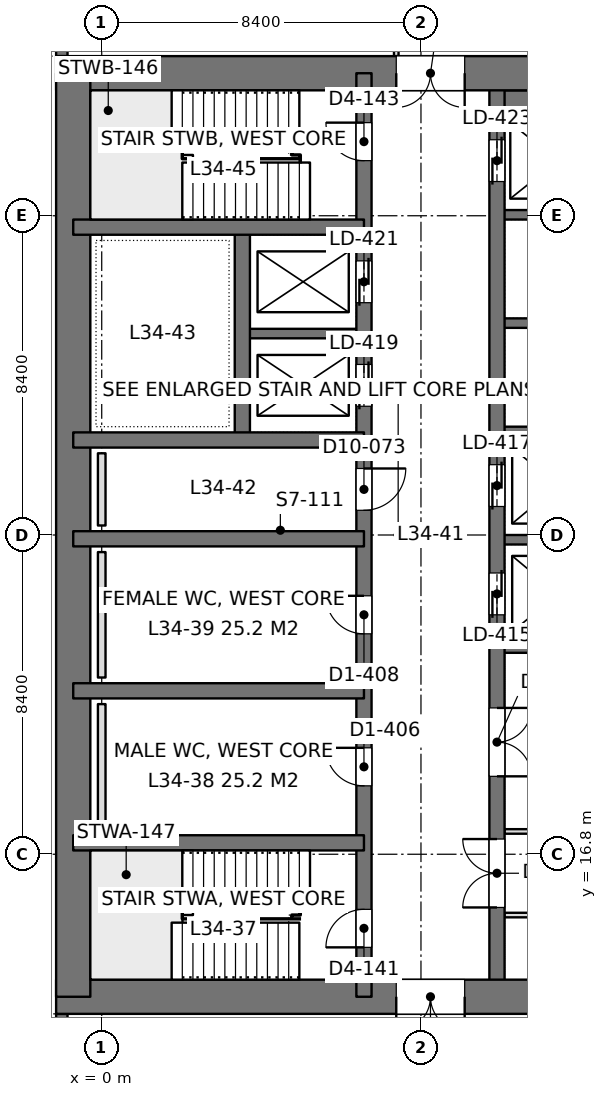
"""IFC4 building model, lengths in metres.
Left out: names, types, materials, properties, quantities, classifications, styles, units other than length and angle.
Written with IfcOpenShell. Run it as: python <this file> out.ifc"""

import sys

from ifc_helpers import new_model, si_unit, direction, frame, frame_2d, origin, place, context, subcontext, project, spatial, rectangle, extrude, element, fill, save


model = new_model("IFC4")
c1 = context("Model", 3, precision=1e-05, world=origin(), true_north=direction((0.0, 1.0)))
c2 = subcontext(c1, "Body", "Model", "MODEL_VIEW")
j1 = project(units=[si_unit("LENGTHUNIT", "METRE"), si_unit("PLANEANGLEUNIT", "RADIAN")], contexts=[c1])
p1 = place(None, origin())
s1 = spatial("IfcSite", under=j1, at=p1, CompositionType="ELEMENT")
p2 = place(p1, origin())
s2 = spatial("IfcBuilding", under=s1, at=p2, CompositionType="ELEMENT")
p3 = place(p2, frame((0.0, 0.0, 151.2)))
s3 = spatial("IfcBuildingStorey", under=s2, at=p3, CompositionType="ELEMENT", Elevation=151.2)
p4 = place(p3, frame((-1.2, 13.05, 0.0), z_axis=(0.0, 0.0, 1.0), x_axis=(1.0, 0.0, 0.0)))
e1 = element("IfcWall", 1, at=p4, inside=s3, PredefinedType="SHEAR", context=c2, shape_type="SweptSolid", body=[
    extrude(rectangle(XDim=18.0, YDim=0.9, at=frame_2d((9.0, 0.0))), origin(), (0.0, 0.0, 1.0), 4.2),
])
p5 = place(p4, frame((8.95, 0.0, 0.0)))
e2 = element("IfcOpeningElement", 2, at=p5, cuts=e1, PredefinedType="OPENING", context=c2, shape_type="SweptSolid", body=[
    extrude(rectangle(XDim=1.8, YDim=2.4, at=frame_2d((0.9, 1.2))), frame((0.0, 0.46, 0.0), z_axis=(0.0, -1.0, 0.0), x_axis=(1.0, 0.0, 0.0)), (0.0, 0.0, 1.0), 0.92),
])
p6 = place(p3, frame((-1.2, 37.35, 0.0), z_axis=(0.0, 0.0, 1.0), x_axis=(1.0, 0.0, 0.0)))
e3 = element("IfcWall", 3, at=p6, inside=s3, PredefinedType="SHEAR", context=c2, shape_type="SweptSolid", body=[
    extrude(rectangle(XDim=18.0, YDim=0.9, at=frame_2d((9.0, 0.0))), origin(), (0.0, 0.0, 1.0), 4.2),
])
p7 = place(p6, frame((8.95, 0.0, 0.0)))
e4 = element("IfcOpeningElement", 4, at=p7, cuts=e3, PredefinedType="OPENING", context=c2, shape_type="SweptSolid", body=[
    extrude(rectangle(XDim=1.8, YDim=2.4, at=frame_2d((0.9, 1.2))), frame((0.0, 0.46, 0.0), z_axis=(0.0, -1.0, 0.0), x_axis=(1.0, 0.0, 0.0)), (0.0, 0.0, 1.0), 0.92),
])
p8 = place(p3, frame((-0.75, 13.05, 0.0), z_axis=(0.0, 0.0, 1.0), x_axis=(0.0, 1.0, 0.0)))
e5 = element("IfcWall", 5, at=p8, inside=s3, PredefinedType="SHEAR", context=c2, shape_type="SweptSolid", body=[
    extrude(rectangle(XDim=24.3, YDim=0.9, at=frame_2d((12.15, 0.0))), origin(), (0.0, 0.0, 1.0), 4.2),
])
p9 = place(p3, frame((6.9, 13.05, 0.0), z_axis=(0.0, 0.0, 1.0), x_axis=(0.0, 1.0, 0.0)))
e6 = element("IfcWall", 6, at=p9, inside=s3, PredefinedType="SHEAR", context=c2, shape_type="SweptSolid", body=[
    extrude(rectangle(XDim=24.3, YDim=0.4, at=frame_2d((12.15, 0.0))), origin(), (0.0, 0.0, 1.0), 4.2),
])
p10 = place(p9, frame((1.3, 0.0, 0.0)))
e7 = element("IfcOpeningElement", 7, at=p10, cuts=e6, PredefinedType="OPENING", context=c2, shape_type="SweptSolid", body=[
    extrude(rectangle(XDim=1.0, YDim=2.2, at=frame_2d((0.5, 1.1))), frame((0.0, 0.21, 0.0), z_axis=(0.0, -1.0, 0.0), x_axis=(1.0, 0.0, 0.0)), (0.0, 0.0, 1.0), 0.42),
])
p11 = place(p9, frame((22.0, 0.0, 0.0)))
e8 = element("IfcOpeningElement", 8, at=p11, cuts=e6, PredefinedType="OPENING", context=c2, shape_type="SweptSolid", body=[
    extrude(rectangle(XDim=1.0, YDim=2.2, at=frame_2d((0.5, 1.1))), frame((0.0, 0.21, 0.0), z_axis=(0.0, -1.0, 0.0), x_axis=(1.0, 0.0, 0.0)), (0.0, 0.0, 1.0), 0.42),
])
p12 = place(p9, frame((5.55, 0.0, 0.0)))
e9 = element("IfcOpeningElement", 9, at=p12, cuts=e6, PredefinedType="OPENING", context=c2, shape_type="SweptSolid", body=[
    extrude(rectangle(XDim=1.0, YDim=2.2, at=frame_2d((0.5, 1.1))), frame((0.0, 0.21, 0.0), z_axis=(0.0, -1.0, 0.0), x_axis=(1.0, 0.0, 0.0)), (0.0, 0.0, 1.0), 0.42),
])
p13 = place(p9, frame((9.55, 0.0, 0.0)))
e10 = element("IfcOpeningElement", 10, at=p13, cuts=e6, PredefinedType="OPENING", context=c2, shape_type="SweptSolid", body=[
    extrude(rectangle(XDim=1.0, YDim=2.2, at=frame_2d((0.5, 1.1))), frame((0.0, 0.21, 0.0), z_axis=(0.0, -1.0, 0.0), x_axis=(1.0, 0.0, 0.0)), (0.0, 0.0, 1.0), 0.42),
])
p14 = place(p9, frame((12.8, 0.0, 0.0)))
e11 = element("IfcOpeningElement", 11, at=p14, cuts=e6, PredefinedType="OPENING", context=c2, shape_type="SweptSolid", body=[
    extrude(rectangle(XDim=1.1, YDim=2.2, at=frame_2d((0.55, 1.1))), frame((0.0, 0.21, 0.0), z_axis=(0.0, -1.0, 0.0), x_axis=(1.0, 0.0, 0.0)), (0.0, 0.0, 1.0), 0.42),
])
p15 = place(p9, frame((15.538, 0.0, 0.0)))
e12 = element("IfcOpeningElement", 12, at=p15, cuts=e6, PredefinedType="OPENING", context=c2, shape_type="SweptSolid", body=[
    extrude(rectangle(XDim=1.1, YDim=2.2, at=frame_2d((0.55, 1.1))), frame((0.0, 0.21, 0.0), z_axis=(0.0, -1.0, 0.0), x_axis=(1.0, 0.0, 0.0)), (0.0, 0.0, 1.0), 0.42),
])
p16 = place(p9, frame((18.262, 0.0, 0.0)))
e13 = element("IfcOpeningElement", 13, at=p16, cuts=e6, PredefinedType="OPENING", context=c2, shape_type="SweptSolid", body=[
    extrude(rectangle(XDim=1.1, YDim=2.2, at=frame_2d((0.55, 1.1))), frame((0.0, 0.21, 0.0), z_axis=(0.0, -1.0, 0.0), x_axis=(1.0, 0.0, 0.0)), (0.0, 0.0, 1.0), 0.42),
])
p17 = place(p3, frame((10.4, 13.05, 0.0), z_axis=(0.0, 0.0, 1.0), x_axis=(0.0, 1.0, 0.0)))
e14 = element("IfcWall", 14, at=p17, inside=s3, PredefinedType="SHEAR", context=c2, shape_type="SweptSolid", body=[
    extrude(rectangle(XDim=24.3, YDim=0.4, at=frame_2d((12.15, 0.0))), origin(), (0.0, 0.0, 1.0), 4.2),
])
p18 = place(p17, frame((10.05, 0.0, 0.0)))
e15 = element("IfcOpeningElement", 15, at=p18, cuts=e14, PredefinedType="OPENING", context=c2, shape_type="SweptSolid", body=[
    extrude(rectangle(XDim=1.1, YDim=2.2, at=frame_2d((0.55, 1.1))), frame((0.0, 0.21, 0.0), z_axis=(0.0, -1.0, 0.0), x_axis=(1.0, 0.0, 0.0)), (0.0, 0.0, 1.0), 0.42),
])
p19 = place(p17, frame((12.9, 0.0, 0.0)))
e16 = element("IfcOpeningElement", 16, at=p19, cuts=e14, PredefinedType="OPENING", context=c2, shape_type="SweptSolid", body=[
    extrude(rectangle(XDim=1.1, YDim=2.2, at=frame_2d((0.55, 1.1))), frame((0.0, 0.21, 0.0), z_axis=(0.0, -1.0, 0.0), x_axis=(1.0, 0.0, 0.0)), (0.0, 0.0, 1.0), 0.42),
])
p20 = place(p17, frame((21.45, 0.0, 0.0)))
e17 = element("IfcOpeningElement", 17, at=p20, cuts=e14, PredefinedType="OPENING", context=c2, shape_type="SweptSolid", body=[
    extrude(rectangle(XDim=1.1, YDim=2.2, at=frame_2d((0.55, 1.1))), frame((0.0, 0.21, 0.0), z_axis=(0.0, -1.0, 0.0), x_axis=(1.0, 0.0, 0.0)), (0.0, 0.0, 1.0), 0.42),
])
p21 = place(p17, frame((2.35, 0.0, 0.0)))
e18 = element("IfcOpeningElement", 18, at=p21, cuts=e14, PredefinedType="OPENING", context=c2, shape_type="SweptSolid", body=[
    extrude(rectangle(XDim=1.8, YDim=2.4, at=frame_2d((0.9, 1.2))), frame((0.0, 0.21, 0.0), z_axis=(0.0, -1.0, 0.0), x_axis=(1.0, 0.0, 0.0)), (0.0, 0.0, 1.0), 0.42),
])
p22 = place(p17, frame((5.8, 0.0, 0.0)))
e19 = element("IfcOpeningElement", 19, at=p22, cuts=e14, PredefinedType="OPENING", context=c2, shape_type="SweptSolid", body=[
    extrude(rectangle(XDim=1.8, YDim=2.4, at=frame_2d((0.9, 1.2))), frame((0.0, 0.21, 0.0), z_axis=(0.0, -1.0, 0.0), x_axis=(1.0, 0.0, 0.0)), (0.0, 0.0, 1.0), 0.42),
])
for number, where, z_axis, x_axis in (
    (20, (-0.75, 17.1, 0.0), (0.0, 0.0, 1.0), (1.0, 0.0, 0.0)),
    (21, (-0.75, 21.1, 0.0), (0.0, 0.0, 1.0), (1.0, 0.0, 0.0)),
    (22, (-0.75, 25.1, 0.0), (0.0, 0.0, 1.0), (1.0, 0.0, 0.0)),
    (23, (-0.75, 27.7, 0.0), (0.0, 0.0, 1.0), (1.0, 0.0, 0.0)),
    (24, (-0.75, 33.3, 0.0), (0.0, 0.0, 1.0), (1.0, 0.0, 0.0)),
):
    element("IfcWall", number, at=place(p3, frame(where, z_axis=z_axis, x_axis=x_axis)), inside=s3, PredefinedType="SHEAR", context=c2, shape_type="SweptSolid", body=[
        extrude(rectangle(XDim=7.65, YDim=0.4, at=frame_2d((3.825, 0.0))), origin(), (0.0, 0.0, 1.0), 4.2),
    ])
p23 = place(p3, frame((3.7, 27.7, 0.0), z_axis=(0.0, 0.0, 1.0), x_axis=(0.0, 1.0, 0.0)))
e25 = element("IfcWall", 25, at=p23, inside=s3, PredefinedType="SHEAR", context=c2, shape_type="SweptSolid", body=[
    extrude(rectangle(XDim=5.6, YDim=0.4, at=frame_2d((2.8, 0.0))), origin(), (0.0, 0.0, 1.0), 4.2),
])
p24 = place(p3, frame((3.7, 30.5, 0.0), z_axis=(0.0, 0.0, 1.0), x_axis=(1.0, 0.0, 0.0)))
e26 = element("IfcWall", 26, at=p24, inside=s3, PredefinedType="SHEAR", context=c2, shape_type="SweptSolid", body=[
    extrude(rectangle(XDim=3.2, YDim=0.25, at=frame_2d((1.6, 0.0))), origin(), (0.0, 0.0, 1.0), 4.2),
])
p25 = place(p3, frame((10.4, 22.225, 0.0), z_axis=(0.0, 0.0, 1.0), x_axis=(1.0, 0.0, 0.0)))
e27 = element("IfcWall", 27, at=p25, inside=s3, PredefinedType="SHEAR", context=c2, shape_type="SweptSolid", body=[
    extrude(rectangle(XDim=5.95, YDim=0.25, at=frame_2d((2.975, 0.0))), origin(), (0.0, 0.0, 1.0), 4.2),
])
for number, where, z_axis, x_axis in (
    (28, (10.4, 25.075, 0.0), (0.0, 0.0, 1.0), (1.0, 0.0, 0.0)),
    (29, (10.4, 27.925, 0.0), (0.0, 0.0, 1.0), (1.0, 0.0, 0.0)),
    (30, (10.4, 30.775, 0.0), (0.0, 0.0, 1.0), (1.0, 0.0, 0.0)),
    (31, (10.4, 33.625, 0.0), (0.0, 0.0, 1.0), (1.0, 0.0, 0.0)),
):
    element("IfcWall", number, at=place(p3, frame(where, z_axis=z_axis, x_axis=x_axis)), inside=s3, PredefinedType="SHEAR", context=c2, shape_type="SweptSolid", body=[
        extrude(rectangle(XDim=3.2, YDim=0.25, at=frame_2d((1.6, 0.0))), origin(), (0.0, 0.0, 1.0), 4.2),
    ])
p26 = place(p3, frame((10.4, 36.625, 0.0), z_axis=(0.0, 0.0, 1.0), x_axis=(1.0, 0.0, 0.0)))
e32 = element("IfcWall", 32, at=p26, inside=s3, PredefinedType="SHEAR", context=c2, shape_type="SweptSolid", body=[
    extrude(rectangle(XDim=3.2, YDim=0.55, at=frame_2d((1.6, 0.0))), origin(), (0.0, 0.0, 1.0), 4.2),
])
p27 = place(p3, frame((-1.05, 8.4, 0.0), z_axis=(0.0, 0.0, 1.0), x_axis=(0.0, 1.0, 0.0)))
e33 = element("IfcWall", 33, at=p27, inside=s3, PredefinedType="SOLIDWALL", context=c2, shape_type="SweptSolid", body=[
    extrude(rectangle(XDim=4.2, YDim=0.3, at=frame_2d((2.1, 0.0))), origin(), (0.0, 0.0, 1.0), 4.05),
])
p28 = place(p27, frame((0.9, 0.0, 0.9)))
e34 = element("IfcOpeningElement", 34, at=p28, cuts=e33, PredefinedType="OPENING", context=c2, shape_type="SweptSolid", body=[
    extrude(rectangle(XDim=2.4, YDim=1.9, at=frame_2d((1.2, 0.95))), frame((0.0, 0.16, 0.0), z_axis=(0.0, -1.0, 0.0), x_axis=(1.0, 0.0, 0.0)), (0.0, 0.0, 1.0), 0.32),
])
p29 = place(p3, frame((-1.05, 37.8, 0.0), z_axis=(0.0, 0.0, 1.0), x_axis=(0.0, 1.0, 0.0)))
e35 = element("IfcWall", 35, at=p29, inside=s3, PredefinedType="SOLIDWALL", context=c2, shape_type="SweptSolid", body=[
    extrude(rectangle(XDim=4.2, YDim=0.3, at=frame_2d((2.1, 0.0))), origin(), (0.0, 0.0, 1.0), 4.05),
])
p30 = place(p29, frame((0.9, 0.0, 0.9)))
e36 = element("IfcOpeningElement", 36, at=p30, cuts=e35, PredefinedType="OPENING", context=c2, shape_type="SweptSolid", body=[
    extrude(rectangle(XDim=2.4, YDim=1.9, at=frame_2d((1.2, 0.95))), frame((0.0, 0.16, 0.0), z_axis=(0.0, -1.0, 0.0), x_axis=(1.0, 0.0, 0.0)), (0.0, 0.0, 1.0), 0.32),
])
p31 = place(p3, frame((10.598, 17.4, 0.0), z_axis=(0.0, 0.0, 1.0), x_axis=(1.0, 0.0, 0.0)))
e37 = element("IfcWall", 37, at=p31, inside=s3, PredefinedType="PARTITIONING", context=c2, shape_type="SweptSolid", body=[
    extrude(rectangle(XDim=5.904, YDim=0.12, at=frame_2d((2.952, 0.0))), origin(), (0.0, 0.0, 1.0), 3.55),
])
p32 = place(p3, frame((10.598, 15.2, 0.0), z_axis=(0.0, 0.0, 1.0), x_axis=(1.0, 0.0, 0.0)))
e38 = element("IfcWall", 38, at=p32, inside=s3, PredefinedType="PARTITIONING", context=c2, shape_type="SweptSolid", body=[
    extrude(rectangle(XDim=6.204, YDim=0.12, at=frame_2d((3.102, 0.0))), origin(), (0.0, 0.0, 1.0), 3.55),
])
p33 = place(p3, frame((7.75, 37.8, 0.0), z_axis=(0.0, 0.0, 1.0), x_axis=(0.0, 1.0, 0.0)))
e39 = element("IfcWall", 39, at=p33, inside=s3, PredefinedType="PARTITIONING", context=c2, shape_type="SweptSolid", body=[
    extrude(rectangle(XDim=2.0, YDim=0.12, at=frame_2d((1.0, 0.0))), origin(), (0.0, 0.0, 1.0), 4.05),
])
for number, where, z_axis, x_axis in (
    (40, (0.0, 17.45, 0.0), (0.0, 0.0, 1.0), (0.0, 1.0, 0.0)),
    (41, (0.0, 21.45, 0.0), (0.0, 0.0, 1.0), (0.0, 1.0, 0.0)),
):
    element("IfcWall", number, at=place(p3, frame(where, z_axis=z_axis, x_axis=x_axis)), inside=s3, PredefinedType="PLUMBINGWALL", context=c2, shape_type="SweptSolid", body=[
        extrude(rectangle(XDim=3.3, YDim=0.2, at=frame_2d((1.65, 0.0))), origin(), (0.0, 0.0, 1.0), 1.2),
    ])
p34 = place(p3, frame((0.0, 25.45, 0.0), z_axis=(0.0, 0.0, 1.0), x_axis=(0.0, 1.0, 0.0)))
e42 = element("IfcWall", 42, at=p34, inside=s3, PredefinedType="PLUMBINGWALL", context=c2, shape_type="SweptSolid", body=[
    extrude(rectangle(XDim=1.9, YDim=0.2, at=frame_2d((0.95, 0.0))), origin(), (0.0, 0.0, 1.0), 1.2),
])
p35 = place(p5, frame((1.8, 0.0, 0.0), z_axis=(0.0, 0.0, 1.0), x_axis=(-1.0, 0.0, 0.0)))
e43 = element("IfcDoor", 43, at=p35, inside=s3, OperationType="DOUBLE_DOOR_SINGLE_SWING", PredefinedType="DOOR", context=c2, shape_type="SweptSolid", body=[
    extrude(rectangle(XDim=1.8, YDim=2.4, at=frame_2d((0.9, 1.2))), frame((0.0, 0.025, 0.0), z_axis=(0.0, -1.0, 0.0), x_axis=(1.0, 0.0, 0.0)), (0.0, 0.0, 1.0), 0.05),
])
fill(e2, e43)
p36 = place(p7, frame((1.8, 0.0, 0.0), z_axis=(0.0, 0.0, 1.0), x_axis=(-1.0, 0.0, 0.0)))
e44 = element("IfcDoor", 44, at=p36, inside=s3, OperationType="DOUBLE_DOOR_SINGLE_SWING", PredefinedType="DOOR", context=c2, shape_type="SweptSolid", body=[
    extrude(rectangle(XDim=1.8, YDim=2.4, at=frame_2d((0.9, 1.2))), frame((0.0, 0.025, 0.0), z_axis=(0.0, -1.0, 0.0), x_axis=(1.0, 0.0, 0.0)), (0.0, 0.0, 1.0), 0.05),
])
fill(e4, e44)
p37 = place(p10, origin())
e45 = element("IfcDoor", 45, at=p37, inside=s3, OperationType="SINGLE_SWING_LEFT", PredefinedType="DOOR", context=c2, shape_type="SweptSolid", body=[
    extrude(rectangle(XDim=1.0, YDim=2.2, at=frame_2d((0.5, 1.1))), frame((0.0, 0.025, 0.0), z_axis=(0.0, -1.0, 0.0), x_axis=(1.0, 0.0, 0.0)), (0.0, 0.0, 1.0), 0.05),
])
fill(e7, e45)
p38 = place(p11, origin())
e46 = element("IfcDoor", 46, at=p38, inside=s3, OperationType="SINGLE_SWING_RIGHT", PredefinedType="DOOR", context=c2, shape_type="SweptSolid", body=[
    extrude(rectangle(XDim=1.0, YDim=2.2, at=frame_2d((0.5, 1.1))), frame((0.0, 0.025, 0.0), z_axis=(0.0, -1.0, 0.0), x_axis=(1.0, 0.0, 0.0)), (0.0, 0.0, 1.0), 0.05),
])
fill(e8, e46)
p39 = place(p12, origin())
e47 = element("IfcDoor", 47, at=p39, inside=s3, OperationType="SINGLE_SWING_RIGHT", PredefinedType="DOOR", context=c2, shape_type="SweptSolid", body=[
    extrude(rectangle(XDim=1.0, YDim=2.2, at=frame_2d((0.5, 1.1))), frame((0.0, 0.025, 0.0), z_axis=(0.0, -1.0, 0.0), x_axis=(1.0, 0.0, 0.0)), (0.0, 0.0, 1.0), 0.05),
])
fill(e9, e47)
p40 = place(p13, origin())
e48 = element("IfcDoor", 48, at=p40, inside=s3, OperationType="SINGLE_SWING_RIGHT", PredefinedType="DOOR", context=c2, shape_type="SweptSolid", body=[
    extrude(rectangle(XDim=1.0, YDim=2.2, at=frame_2d((0.5, 1.1))), frame((0.0, 0.025, 0.0), z_axis=(0.0, -1.0, 0.0), x_axis=(1.0, 0.0, 0.0)), (0.0, 0.0, 1.0), 0.05),
])
fill(e10, e48)
p41 = place(p14, frame((1.1, 0.0, 0.0), z_axis=(0.0, 0.0, 1.0), x_axis=(-1.0, 0.0, 0.0)))
e49 = element("IfcDoor", 49, at=p41, inside=s3, OperationType="SINGLE_SWING_LEFT", PredefinedType="DOOR", context=c2, shape_type="SweptSolid", body=[
    extrude(rectangle(XDim=1.1, YDim=2.2, at=frame_2d((0.55, 1.1))), frame((0.0, 0.025, 0.0), z_axis=(0.0, -1.0, 0.0), x_axis=(1.0, 0.0, 0.0)), (0.0, 0.0, 1.0), 0.05),
])
fill(e11, e49)
p42 = place(p18, origin())
e50 = element("IfcDoor", 50, at=p42, inside=s3, OperationType="DOUBLE_DOOR_SLIDING", PredefinedType="DOOR", context=c2, shape_type="SweptSolid", body=[
    extrude(rectangle(XDim=1.1, YDim=2.2, at=frame_2d((0.55, 1.1))), frame((0.0, 0.025, 0.0), z_axis=(0.0, -1.0, 0.0), x_axis=(1.0, 0.0, 0.0)), (0.0, 0.0, 1.0), 0.05),
])
fill(e15, e50)
p43 = place(p19, origin())
e51 = element("IfcDoor", 51, at=p43, inside=s3, OperationType="DOUBLE_DOOR_SLIDING", PredefinedType="DOOR", context=c2, shape_type="SweptSolid", body=[
    extrude(rectangle(XDim=1.1, YDim=2.2, at=frame_2d((0.55, 1.1))), frame((0.0, 0.025, 0.0), z_axis=(0.0, -1.0, 0.0), x_axis=(1.0, 0.0, 0.0)), (0.0, 0.0, 1.0), 0.05),
])
fill(e16, e51)
p44 = place(p20, origin())
e52 = element("IfcDoor", 52, at=p44, inside=s3, OperationType="DOUBLE_DOOR_SLIDING", PredefinedType="DOOR", context=c2, shape_type="SweptSolid", body=[
    extrude(rectangle(XDim=1.1, YDim=2.2, at=frame_2d((0.55, 1.1))), frame((0.0, 0.025, 0.0), z_axis=(0.0, -1.0, 0.0), x_axis=(1.0, 0.0, 0.0)), (0.0, 0.0, 1.0), 0.05),
])
fill(e17, e52)
p45 = place(p15, origin())
e53 = element("IfcDoor", 53, at=p45, inside=s3, OperationType="DOUBLE_DOOR_SLIDING", PredefinedType="DOOR", context=c2, shape_type="SweptSolid", body=[
    extrude(rectangle(XDim=1.1, YDim=2.2, at=frame_2d((0.55, 1.1))), frame((0.0, 0.025, 0.0), z_axis=(0.0, -1.0, 0.0), x_axis=(1.0, 0.0, 0.0)), (0.0, 0.0, 1.0), 0.05),
])
fill(e12, e53)
p46 = place(p16, origin())
e54 = element("IfcDoor", 54, at=p46, inside=s3, OperationType="DOUBLE_DOOR_SLIDING", PredefinedType="DOOR", context=c2, shape_type="SweptSolid", body=[
    extrude(rectangle(XDim=1.1, YDim=2.2, at=frame_2d((0.55, 1.1))), frame((0.0, 0.025, 0.0), z_axis=(0.0, -1.0, 0.0), x_axis=(1.0, 0.0, 0.0)), (0.0, 0.0, 1.0), 0.05),
])
fill(e13, e54)
p47 = place(p21, origin())
e55 = element("IfcDoor", 55, at=p47, inside=s3, OperationType="DOUBLE_DOOR_SINGLE_SWING", PredefinedType="DOOR", context=c2, shape_type="SweptSolid", body=[
    extrude(rectangle(XDim=1.8, YDim=2.4, at=frame_2d((0.9, 1.2))), frame((0.0, 0.025, 0.0), z_axis=(0.0, -1.0, 0.0), x_axis=(1.0, 0.0, 0.0)), (0.0, 0.0, 1.0), 0.05),
])
fill(e18, e55)
p48 = place(p22, frame((1.8, 0.0, 0.0), z_axis=(0.0, 0.0, 1.0), x_axis=(-1.0, 0.0, 0.0)))
e56 = element("IfcDoor", 56, at=p48, inside=s3, OperationType="DOUBLE_DOOR_SINGLE_SWING", PredefinedType="DOOR", context=c2, shape_type="SweptSolid", body=[
    extrude(rectangle(XDim=1.8, YDim=2.4, at=frame_2d((0.9, 1.2))), frame((0.0, 0.025, 0.0), z_axis=(0.0, -1.0, 0.0), x_axis=(1.0, 0.0, 0.0)), (0.0, 0.0, 1.0), 0.05),
])
fill(e19, e56)
save(model, sys.argv[1])
